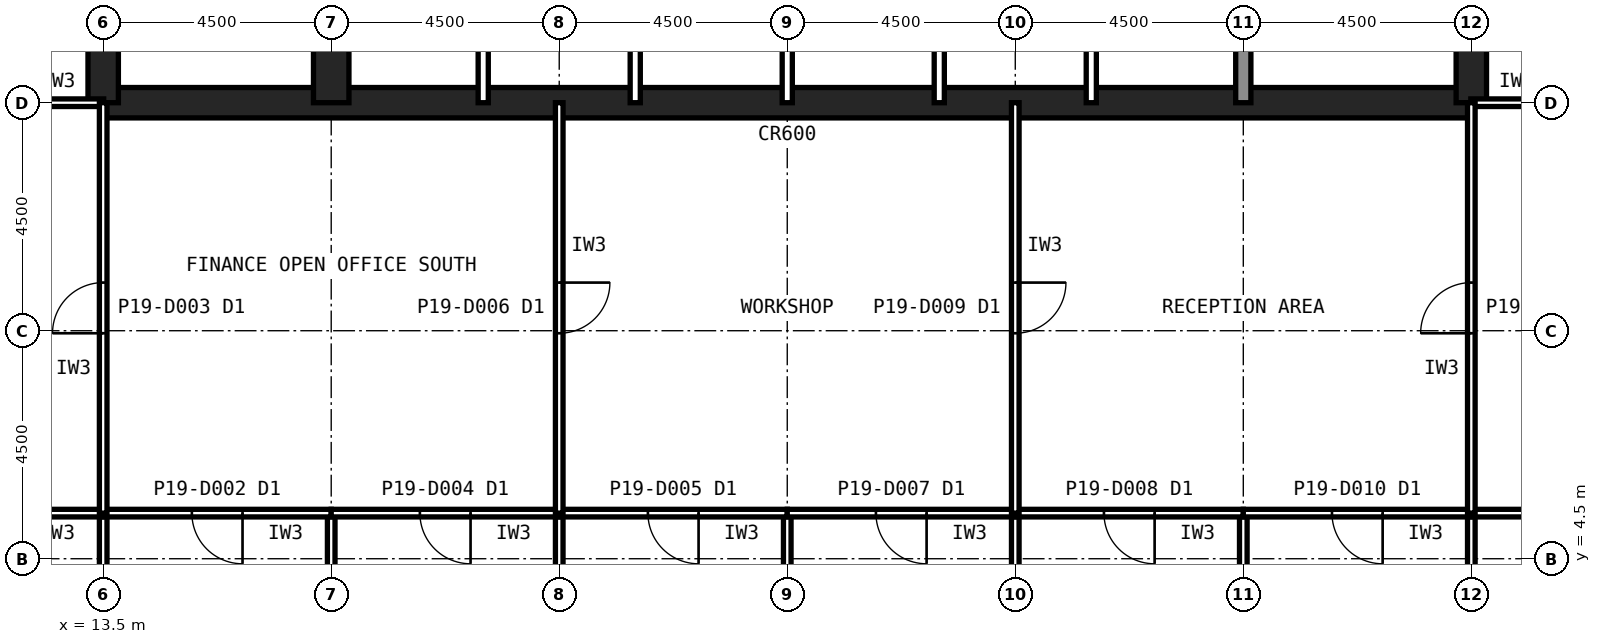
"""IFC4 building model, lengths in metres.
Left out: names, types, materials, properties, quantities, classifications, styles, units other than length and angle.
Written with IfcOpenShell. Run it as: python <this file> out.ifc"""

import sys

from ifc_helpers import new_model, si_unit, direction, frame, frame_2d, origin, place, context, subcontext, project, spatial, rectangle, extrude, element, fill, save


model = new_model("IFC4")
c1 = context("Model", 3, precision=1e-05, world=origin(), true_north=direction((0.0, 1.0)))
c2 = subcontext(c1, "Body", "Model", "MODEL_VIEW")
j1 = project(units=[si_unit("LENGTHUNIT", "METRE"), si_unit("PLANEANGLEUNIT", "RADIAN")], contexts=[c1])
p1 = place(None, origin())
s1 = spatial("IfcSite", under=j1, at=p1, CompositionType="ELEMENT")
p2 = place(p1, origin())
s2 = spatial("IfcBuilding", under=s1, at=p2, CompositionType="ELEMENT")
p3 = place(p2, frame((0.0, 0.0, 79.4)))
s3 = spatial("IfcBuildingStorey", under=s2, at=p3, CompositionType="ELEMENT", Elevation=79.4)
p4 = place(p3, frame((13.5, 13.5, 0.0), z_axis=(0.0, 0.0, 1.0), x_axis=(1.0, 0.0, 0.0)))
e1 = element("IfcWall", 1, at=p4, inside=s3, PredefinedType="SHEAR", context=c2, shape_type="SweptSolid", body=[
    extrude(rectangle(XDim=27.0, YDim=0.6, at=frame_2d((13.5, 0.0))), origin(), (0.0, 0.0, 1.0), 4.2),
])
p5 = place(p3, frame((40.5, 13.5, 0.0), z_axis=(0.0, 0.0, 1.0), x_axis=(0.0, 1.0, 0.0)))
e2 = element("IfcWall", 2, at=p5, inside=s3, PredefinedType="SHEAR", context=c2, shape_type="SweptSolid", body=[
    extrude(rectangle(XDim=27.0, YDim=0.6, at=frame_2d((13.5, 0.0))), origin(), (0.0, 0.0, 1.0), 4.2),
])
p6 = place(p5, frame((5.85, 0.0, 0.0)))
e3 = element("IfcOpeningElement", 3, at=p6, cuts=e2, PredefinedType="OPENING", context=c2, shape_type="SweptSolid", body=[
    extrude(rectangle(XDim=1.8, YDim=2.1, at=frame_2d((0.9, 1.05))), frame((0.0, 0.31, 0.0), z_axis=(0.0, -1.0, 0.0), x_axis=(1.0, 0.0, 0.0)), (0.0, 0.0, 1.0), 0.62),
])
p7 = place(p5, frame((19.65, 0.0, 0.0)))
e4 = element("IfcOpeningElement", 4, at=p7, cuts=e2, PredefinedType="OPENING", context=c2, shape_type="SweptSolid", body=[
    extrude(rectangle(XDim=1.2, YDim=2.1, at=frame_2d((0.6, 1.05))), frame((0.0, 0.31, 0.0), z_axis=(0.0, -1.0, 0.0), x_axis=(1.0, 0.0, 0.0)), (0.0, 0.0, 1.0), 0.62),
])
p8 = place(p3, frame((13.5, 40.5, 0.0), z_axis=(0.0, 0.0, 1.0), x_axis=(0.0, -1.0, 0.0)))
e5 = element("IfcWall", 5, at=p8, inside=s3, PredefinedType="SHEAR", context=c2, shape_type="SweptSolid", body=[
    extrude(rectangle(XDim=27.0, YDim=0.6, at=frame_2d((13.5, 0.0))), origin(), (0.0, 0.0, 1.0), 4.2),
])
p9 = place(p8, frame((19.65, 0.0, 0.0)))
e6 = element("IfcOpeningElement", 6, at=p9, cuts=e5, PredefinedType="OPENING", context=c2, shape_type="SweptSolid", body=[
    extrude(rectangle(XDim=1.2, YDim=2.1, at=frame_2d((0.6, 1.05))), frame((0.0, 0.31, 0.0), z_axis=(0.0, -1.0, 0.0), x_axis=(1.0, 0.0, 0.0)), (0.0, 0.0, 1.0), 0.62),
])
p10 = place(p8, frame((5.85, 0.0, 0.0)))
e7 = element("IfcOpeningElement", 7, at=p10, cuts=e5, PredefinedType="OPENING", context=c2, shape_type="SweptSolid", body=[
    extrude(rectangle(XDim=1.8, YDim=2.1, at=frame_2d((0.9, 1.05))), frame((0.0, 0.31, 0.0), z_axis=(0.0, -1.0, 0.0), x_axis=(1.0, 0.0, 0.0)), (0.0, 0.0, 1.0), 0.62),
])
p11 = place(p3, frame((18.0, 13.5, 0.0), z_axis=(0.0, 0.0, 1.0), x_axis=(0.0, 1.0, 0.0)))
e8 = element("IfcWall", 8, at=p11, inside=s3, PredefinedType="SHEAR", context=c2, shape_type="SweptSolid", body=[
    extrude(rectangle(XDim=18.0, YDim=0.7, at=frame_2d((9.0, 0.0))), origin(), (0.0, 0.0, 1.0), 4.2),
])
p12 = place(p3, frame((36.0, 13.5, 0.0), z_axis=(0.0, 0.0, 1.0), x_axis=(0.0, 1.0, 0.0)))
e9 = element("IfcWall", 9, at=p12, inside=s3, PredefinedType="SOLIDWALL", context=c2, shape_type="SweptSolid", body=[
    extrude(rectangle(XDim=4.5, YDim=0.3, at=frame_2d((2.25, 0.0))), origin(), (0.0, 0.0, 1.0), 4.04),
])
for number, where, z_axis, x_axis in (
    (10, (21.0, 13.5, 0.0), (0.0, 0.0, 1.0), (0.0, 1.0, 0.0)),
    (11, (24.0, 13.5, 0.0), (0.0, 0.0, 1.0), (0.0, 1.0, 0.0)),
    (12, (27.0, 13.5, 0.0), (0.0, 0.0, 1.0), (0.0, 1.0, 0.0)),
    (13, (30.0, 13.5, 0.0), (0.0, 0.0, 1.0), (0.0, 1.0, 0.0)),
    (14, (33.0, 13.5, 0.0), (0.0, 0.0, 1.0), (0.0, 1.0, 0.0)),
):
    element("IfcWall", number, at=place(p3, frame(where, z_axis=z_axis, x_axis=x_axis)), inside=s3, PredefinedType="PARTITIONING", context=c2, shape_type="SweptSolid", body=[
        extrude(rectangle(XDim=4.5, YDim=0.2, at=frame_2d((2.25, 0.0))), origin(), (0.0, 0.0, 1.0), 4.04),
    ])
for number, where, z_axis, x_axis in (
    (15, (11.7, 13.5, 0.0), (0.0, 0.0, 1.0), (1.0, 0.0, 0.0)),
    (16, (40.49, 13.5, 0.0), (0.0, 0.0, 1.0), (1.0, 0.0, 0.0)),
):
    element("IfcWall", number, at=place(p3, frame(where, z_axis=z_axis, x_axis=x_axis)), inside=s3, PredefinedType="PARTITIONING", context=c2, shape_type="SweptSolid", body=[
        extrude(rectangle(XDim=1.81, YDim=0.15, at=frame_2d((0.905, 0.0))), origin(), (0.0, 0.0, 1.0), 3.189),
    ])
p13 = place(p3, frame((13.5, 0.435, 0.0), z_axis=(0.0, 0.0, 1.0), x_axis=(0.0, 1.0, 0.0)))
e17 = element("IfcWall", 17, at=p13, inside=s3, PredefinedType="PARTITIONING", context=c2, shape_type="SweptSolid", body=[
    extrude(rectangle(XDim=4.965, YDim=0.15, at=frame_2d((2.482, 0.0))), origin(), (0.0, 0.0, 1.0), 3.189),
])
p14 = place(p3, frame((13.5, 5.4, 0.0), z_axis=(0.0, 0.0, 1.0), x_axis=(-1.0, 0.0, 0.0)))
e18 = element("IfcWall", 18, at=p14, inside=s3, PredefinedType="PARTITIONING", context=c2, shape_type="SweptSolid", body=[
    extrude(rectangle(XDim=4.5, YDim=0.15, at=frame_2d((2.25, 0.0))), origin(), (0.0, 0.0, 1.0), 4.04),
])
p15 = place(p14, frame((1.75, 0.0, 0.0)))
e19 = element("IfcOpeningElement", 19, at=p15, cuts=e18, PredefinedType="OPENING", context=c2, shape_type="SweptSolid", body=[
    extrude(rectangle(XDim=1.0, YDim=2.1, at=frame_2d((0.5, 1.05))), frame((0.0, 0.085, 0.0), z_axis=(0.0, -1.0, 0.0), x_axis=(1.0, 0.0, 0.0)), (0.0, 0.0, 1.0), 0.17),
])
p16 = place(p3, frame((18.0, 0.46, 0.0), z_axis=(0.0, 0.0, 1.0), x_axis=(0.0, 1.0, 0.0)))
e20 = element("IfcWall", 20, at=p16, inside=s3, PredefinedType="PARTITIONING", context=c2, shape_type="SweptSolid", body=[
    extrude(rectangle(XDim=4.94, YDim=0.15, at=frame_2d((2.47, 0.0))), origin(), (0.0, 0.0, 1.0), 3.189),
])
p17 = place(p3, frame((18.0, 5.4, 0.0), z_axis=(0.0, 0.0, 1.0), x_axis=(-1.0, 0.0, 0.0)))
e21 = element("IfcWall", 21, at=p17, inside=s3, PredefinedType="PARTITIONING", context=c2, shape_type="SweptSolid", body=[
    extrude(rectangle(XDim=4.5, YDim=0.15, at=frame_2d((2.25, 0.0))), origin(), (0.0, 0.0, 1.0), 4.04),
])
p18 = place(p17, frame((1.75, 0.0, 0.0)))
e22 = element("IfcOpeningElement", 22, at=p18, cuts=e21, PredefinedType="OPENING", context=c2, shape_type="SweptSolid", body=[
    extrude(rectangle(XDim=1.0, YDim=2.1, at=frame_2d((0.5, 1.05))), frame((0.0, 0.085, 0.0), z_axis=(0.0, -1.0, 0.0), x_axis=(1.0, 0.0, 0.0)), (0.0, 0.0, 1.0), 0.17),
])
p19 = place(p3, frame((22.5, 0.41, 0.0), z_axis=(0.0, 0.0, 1.0), x_axis=(0.0, 1.0, 0.0)))
e23 = element("IfcWall", 23, at=p19, inside=s3, PredefinedType="PARTITIONING", context=c2, shape_type="SweptSolid", body=[
    extrude(rectangle(XDim=4.99, YDim=0.15, at=frame_2d((2.495, 0.0))), origin(), (0.0, 0.0, 1.0), 3.189),
])
p20 = place(p3, frame((22.5, 5.4, 0.0), z_axis=(0.0, 0.0, 1.0), x_axis=(-1.0, 0.0, 0.0)))
e24 = element("IfcWall", 24, at=p20, inside=s3, PredefinedType="PARTITIONING", context=c2, shape_type="SweptSolid", body=[
    extrude(rectangle(XDim=4.5, YDim=0.15, at=frame_2d((2.25, 0.0))), origin(), (0.0, 0.0, 1.0), 4.04),
])
p21 = place(p20, frame((1.75, 0.0, 0.0)))
e25 = element("IfcOpeningElement", 25, at=p21, cuts=e24, PredefinedType="OPENING", context=c2, shape_type="SweptSolid", body=[
    extrude(rectangle(XDim=1.0, YDim=2.1, at=frame_2d((0.5, 1.05))), frame((0.0, 0.085, 0.0), z_axis=(0.0, -1.0, 0.0), x_axis=(1.0, 0.0, 0.0)), (0.0, 0.0, 1.0), 0.17),
])
p22 = place(p3, frame((27.0, 0.41, 0.0), z_axis=(0.0, 0.0, 1.0), x_axis=(0.0, 1.0, 0.0)))
e26 = element("IfcWall", 26, at=p22, inside=s3, PredefinedType="PARTITIONING", context=c2, shape_type="SweptSolid", body=[
    extrude(rectangle(XDim=4.99, YDim=0.15, at=frame_2d((2.495, 0.0))), origin(), (0.0, 0.0, 1.0), 3.189),
])
p23 = place(p3, frame((27.0, 5.4, 0.0), z_axis=(0.0, 0.0, 1.0), x_axis=(-1.0, 0.0, 0.0)))
e27 = element("IfcWall", 27, at=p23, inside=s3, PredefinedType="PARTITIONING", context=c2, shape_type="SweptSolid", body=[
    extrude(rectangle(XDim=4.5, YDim=0.15, at=frame_2d((2.25, 0.0))), origin(), (0.0, 0.0, 1.0), 4.04),
])
p24 = place(p23, frame((1.75, 0.0, 0.0)))
e28 = element("IfcOpeningElement", 28, at=p24, cuts=e27, PredefinedType="OPENING", context=c2, shape_type="SweptSolid", body=[
    extrude(rectangle(XDim=1.0, YDim=2.1, at=frame_2d((0.5, 1.05))), frame((0.0, 0.085, 0.0), z_axis=(0.0, -1.0, 0.0), x_axis=(1.0, 0.0, 0.0)), (0.0, 0.0, 1.0), 0.17),
])
p25 = place(p3, frame((31.5, 0.41, 0.0), z_axis=(0.0, 0.0, 1.0), x_axis=(0.0, 1.0, 0.0)))
e29 = element("IfcWall", 29, at=p25, inside=s3, PredefinedType="PARTITIONING", context=c2, shape_type="SweptSolid", body=[
    extrude(rectangle(XDim=4.99, YDim=0.15, at=frame_2d((2.495, 0.0))), origin(), (0.0, 0.0, 1.0), 3.189),
])
p26 = place(p3, frame((31.5, 5.4, 0.0), z_axis=(0.0, 0.0, 1.0), x_axis=(-1.0, 0.0, 0.0)))
e30 = element("IfcWall", 30, at=p26, inside=s3, PredefinedType="PARTITIONING", context=c2, shape_type="SweptSolid", body=[
    extrude(rectangle(XDim=4.5, YDim=0.15, at=frame_2d((2.25, 0.0))), origin(), (0.0, 0.0, 1.0), 4.04),
])
p27 = place(p26, frame((1.75, 0.0, 0.0)))
e31 = element("IfcOpeningElement", 31, at=p27, cuts=e30, PredefinedType="OPENING", context=c2, shape_type="SweptSolid", body=[
    extrude(rectangle(XDim=1.0, YDim=2.1, at=frame_2d((0.5, 1.05))), frame((0.0, 0.085, 0.0), z_axis=(0.0, -1.0, 0.0), x_axis=(1.0, 0.0, 0.0)), (0.0, 0.0, 1.0), 0.17),
])
p28 = place(p3, frame((36.0, 0.46, 0.0), z_axis=(0.0, 0.0, 1.0), x_axis=(0.0, 1.0, 0.0)))
e32 = element("IfcWall", 32, at=p28, inside=s3, PredefinedType="PARTITIONING", context=c2, shape_type="SweptSolid", body=[
    extrude(rectangle(XDim=4.94, YDim=0.15, at=frame_2d((2.47, 0.0))), origin(), (0.0, 0.0, 1.0), 3.189),
])
p29 = place(p3, frame((36.0, 5.4, 0.0), z_axis=(0.0, 0.0, 1.0), x_axis=(-1.0, 0.0, 0.0)))
e33 = element("IfcWall", 33, at=p29, inside=s3, PredefinedType="PARTITIONING", context=c2, shape_type="SweptSolid", body=[
    extrude(rectangle(XDim=4.5, YDim=0.15, at=frame_2d((2.25, 0.0))), origin(), (0.0, 0.0, 1.0), 4.04),
])
p30 = place(p29, frame((1.75, 0.0, 0.0)))
e34 = element("IfcOpeningElement", 34, at=p30, cuts=e33, PredefinedType="OPENING", context=c2, shape_type="SweptSolid", body=[
    extrude(rectangle(XDim=1.0, YDim=2.1, at=frame_2d((0.5, 1.05))), frame((0.0, 0.085, 0.0), z_axis=(0.0, -1.0, 0.0), x_axis=(1.0, 0.0, 0.0)), (0.0, 0.0, 1.0), 0.17),
])
p31 = place(p3, frame((40.5, 0.435, 0.0), z_axis=(0.0, 0.0, 1.0), x_axis=(0.0, 1.0, 0.0)))
e35 = element("IfcWall", 35, at=p31, inside=s3, PredefinedType="PARTITIONING", context=c2, shape_type="SweptSolid", body=[
    extrude(rectangle(XDim=4.965, YDim=0.15, at=frame_2d((2.482, 0.0))), origin(), (0.0, 0.0, 1.0), 3.189),
])
p32 = place(p3, frame((40.5, 5.4, 0.0), z_axis=(0.0, 0.0, 1.0), x_axis=(-1.0, 0.0, 0.0)))
e36 = element("IfcWall", 36, at=p32, inside=s3, PredefinedType="PARTITIONING", context=c2, shape_type="SweptSolid", body=[
    extrude(rectangle(XDim=4.5, YDim=0.15, at=frame_2d((2.25, 0.0))), origin(), (0.0, 0.0, 1.0), 4.04),
])
p33 = place(p32, frame((1.75, 0.0, 0.0)))
e37 = element("IfcOpeningElement", 37, at=p33, cuts=e36, PredefinedType="OPENING", context=c2, shape_type="SweptSolid", body=[
    extrude(rectangle(XDim=1.0, YDim=2.1, at=frame_2d((0.5, 1.05))), frame((0.0, 0.085, 0.0), z_axis=(0.0, -1.0, 0.0), x_axis=(1.0, 0.0, 0.0)), (0.0, 0.0, 1.0), 0.17),
])
p34 = place(p3, frame((45.0, 5.4, 0.0), z_axis=(0.0, 0.0, 1.0), x_axis=(-1.0, 0.0, 0.0)))
e38 = element("IfcWall", 38, at=p34, inside=s3, PredefinedType="PARTITIONING", context=c2, shape_type="SweptSolid", body=[
    extrude(rectangle(XDim=4.5, YDim=0.15, at=frame_2d((2.25, 0.0))), origin(), (0.0, 0.0, 1.0), 4.04),
])
p35 = place(p34, frame((1.75, 0.0, 0.0)))
e39 = element("IfcOpeningElement", 39, at=p35, cuts=e38, PredefinedType="OPENING", context=c2, shape_type="SweptSolid", body=[
    extrude(rectangle(XDim=1.0, YDim=2.1, at=frame_2d((0.5, 1.05))), frame((0.0, 0.085, 0.0), z_axis=(0.0, -1.0, 0.0), x_axis=(1.0, 0.0, 0.0)), (0.0, 0.0, 1.0), 0.17),
])
p36 = place(p3, frame((40.5, 5.4, 0.0), z_axis=(0.0, 0.0, 1.0), x_axis=(0.0, 1.0, 0.0)))
e40 = element("IfcWall", 40, at=p36, inside=s3, PredefinedType="PARTITIONING", context=c2, shape_type="SweptSolid", body=[
    extrude(rectangle(XDim=8.1, YDim=0.15, at=frame_2d((4.05, 0.0))), origin(), (0.0, 0.0, 1.0), 3.189),
])
p37 = place(p36, frame((3.55, 0.0, 0.0)))
e41 = element("IfcOpeningElement", 41, at=p37, cuts=e40, PredefinedType="OPENING", context=c2, shape_type="SweptSolid", body=[
    extrude(rectangle(XDim=1.0, YDim=2.1, at=frame_2d((0.5, 1.05))), frame((0.0, 0.085, 0.0), z_axis=(0.0, -1.0, 0.0), x_axis=(1.0, 0.0, 0.0)), (0.0, 0.0, 1.0), 0.17),
])
p38 = place(p3, frame((13.5, 5.4, 0.0), z_axis=(0.0, 0.0, 1.0), x_axis=(0.0, 1.0, 0.0)))
e42 = element("IfcWall", 42, at=p38, inside=s3, PredefinedType="PARTITIONING", context=c2, shape_type="SweptSolid", body=[
    extrude(rectangle(XDim=8.1, YDim=0.15, at=frame_2d((4.05, 0.0))), origin(), (0.0, 0.0, 1.0), 3.189),
])
p39 = place(p38, frame((3.55, 0.0, 0.0)))
e43 = element("IfcOpeningElement", 43, at=p39, cuts=e42, PredefinedType="OPENING", context=c2, shape_type="SweptSolid", body=[
    extrude(rectangle(XDim=1.0, YDim=2.1, at=frame_2d((0.5, 1.05))), frame((0.0, 0.085, 0.0), z_axis=(0.0, -1.0, 0.0), x_axis=(1.0, 0.0, 0.0)), (0.0, 0.0, 1.0), 0.17),
])
p40 = place(p3, frame((22.5, 13.5, 0.0), z_axis=(0.0, 0.0, 1.0), x_axis=(0.0, -1.0, 0.0)))
e44 = element("IfcWall", 44, at=p40, inside=s3, PredefinedType="PARTITIONING", context=c2, shape_type="SweptSolid", body=[
    extrude(rectangle(XDim=8.1, YDim=0.15, at=frame_2d((4.05, 0.0))), origin(), (0.0, 0.0, 1.0), 3.189),
])
p41 = place(p40, frame((3.55, 0.0, 0.0)))
e45 = element("IfcOpeningElement", 45, at=p41, cuts=e44, PredefinedType="OPENING", context=c2, shape_type="SweptSolid", body=[
    extrude(rectangle(XDim=1.0, YDim=2.1, at=frame_2d((0.5, 1.05))), frame((0.0, 0.085, 0.0), z_axis=(0.0, -1.0, 0.0), x_axis=(1.0, 0.0, 0.0)), (0.0, 0.0, 1.0), 0.17),
])
p42 = place(p3, frame((31.5, 13.5, 0.0), z_axis=(0.0, 0.0, 1.0), x_axis=(0.0, -1.0, 0.0)))
e46 = element("IfcWall", 46, at=p42, inside=s3, PredefinedType="PARTITIONING", context=c2, shape_type="SweptSolid", body=[
    extrude(rectangle(XDim=8.1, YDim=0.15, at=frame_2d((4.05, 0.0))), origin(), (0.0, 0.0, 1.0), 3.189),
])
p43 = place(p42, frame((3.55, 0.0, 0.0)))
e47 = element("IfcOpeningElement", 47, at=p43, cuts=e46, PredefinedType="OPENING", context=c2, shape_type="SweptSolid", body=[
    extrude(rectangle(XDim=1.0, YDim=2.1, at=frame_2d((0.5, 1.05))), frame((0.0, 0.085, 0.0), z_axis=(0.0, -1.0, 0.0), x_axis=(1.0, 0.0, 0.0)), (0.0, 0.0, 1.0), 0.17),
])
p44 = place(p18, origin())
e48 = element("IfcDoor", 48, at=p44, inside=s3, OperationType="SINGLE_SWING_LEFT", PredefinedType="DOOR", context=c2, shape_type="SweptSolid", body=[
    extrude(rectangle(XDim=1.0, YDim=2.1, at=frame_2d((0.5, 1.05))), frame((0.0, 0.025, 0.0), z_axis=(0.0, -1.0, 0.0), x_axis=(1.0, 0.0, 0.0)), (0.0, 0.0, 1.0), 0.05),
])
fill(e22, e48)
p45 = place(p21, origin())
e49 = element("IfcDoor", 49, at=p45, inside=s3, OperationType="SINGLE_SWING_LEFT", PredefinedType="DOOR", context=c2, shape_type="SweptSolid", body=[
    extrude(rectangle(XDim=1.0, YDim=2.1, at=frame_2d((0.5, 1.05))), frame((0.0, 0.025, 0.0), z_axis=(0.0, -1.0, 0.0), x_axis=(1.0, 0.0, 0.0)), (0.0, 0.0, 1.0), 0.05),
])
fill(e25, e49)
p46 = place(p24, origin())
e50 = element("IfcDoor", 50, at=p46, inside=s3, OperationType="SINGLE_SWING_LEFT", PredefinedType="DOOR", context=c2, shape_type="SweptSolid", body=[
    extrude(rectangle(XDim=1.0, YDim=2.1, at=frame_2d((0.5, 1.05))), frame((0.0, 0.025, 0.0), z_axis=(0.0, -1.0, 0.0), x_axis=(1.0, 0.0, 0.0)), (0.0, 0.0, 1.0), 0.05),
])
fill(e28, e50)
p47 = place(p27, origin())
e51 = element("IfcDoor", 51, at=p47, inside=s3, OperationType="SINGLE_SWING_LEFT", PredefinedType="DOOR", context=c2, shape_type="SweptSolid", body=[
    extrude(rectangle(XDim=1.0, YDim=2.1, at=frame_2d((0.5, 1.05))), frame((0.0, 0.025, 0.0), z_axis=(0.0, -1.0, 0.0), x_axis=(1.0, 0.0, 0.0)), (0.0, 0.0, 1.0), 0.05),
])
fill(e31, e51)
p48 = place(p30, origin())
e52 = element("IfcDoor", 52, at=p48, inside=s3, OperationType="SINGLE_SWING_LEFT", PredefinedType="DOOR", context=c2, shape_type="SweptSolid", body=[
    extrude(rectangle(XDim=1.0, YDim=2.1, at=frame_2d((0.5, 1.05))), frame((0.0, 0.025, 0.0), z_axis=(0.0, -1.0, 0.0), x_axis=(1.0, 0.0, 0.0)), (0.0, 0.0, 1.0), 0.05),
])
fill(e34, e52)
p49 = place(p33, origin())
e53 = element("IfcDoor", 53, at=p49, inside=s3, OperationType="SINGLE_SWING_LEFT", PredefinedType="DOOR", context=c2, shape_type="SweptSolid", body=[
    extrude(rectangle(XDim=1.0, YDim=2.1, at=frame_2d((0.5, 1.05))), frame((0.0, 0.025, 0.0), z_axis=(0.0, -1.0, 0.0), x_axis=(1.0, 0.0, 0.0)), (0.0, 0.0, 1.0), 0.05),
])
fill(e37, e53)
p50 = place(p37, origin())
e54 = element("IfcDoor", 54, at=p50, inside=s3, OperationType="SINGLE_SWING_LEFT", PredefinedType="DOOR", context=c2, shape_type="SweptSolid", body=[
    extrude(rectangle(XDim=1.0, YDim=2.1, at=frame_2d((0.5, 1.05))), frame((0.0, 0.025, 0.0), z_axis=(0.0, -1.0, 0.0), x_axis=(1.0, 0.0, 0.0)), (0.0, 0.0, 1.0), 0.05),
])
fill(e41, e54)
p51 = place(p39, origin())
e55 = element("IfcDoor", 55, at=p51, inside=s3, OperationType="SINGLE_SWING_LEFT", PredefinedType="DOOR", context=c2, shape_type="SweptSolid", body=[
    extrude(rectangle(XDim=1.0, YDim=2.1, at=frame_2d((0.5, 1.05))), frame((0.0, 0.025, 0.0), z_axis=(0.0, -1.0, 0.0), x_axis=(1.0, 0.0, 0.0)), (0.0, 0.0, 1.0), 0.05),
])
fill(e43, e55)
p52 = place(p41, origin())
e56 = element("IfcDoor", 56, at=p52, inside=s3, OperationType="SINGLE_SWING_LEFT", PredefinedType="DOOR", context=c2, shape_type="SweptSolid", body=[
    extrude(rectangle(XDim=1.0, YDim=2.1, at=frame_2d((0.5, 1.05))), frame((0.0, 0.025, 0.0), z_axis=(0.0, -1.0, 0.0), x_axis=(1.0, 0.0, 0.0)), (0.0, 0.0, 1.0), 0.05),
])
fill(e45, e56)
p53 = place(p43, origin())
e57 = element("IfcDoor", 57, at=p53, inside=s3, OperationType="SINGLE_SWING_LEFT", PredefinedType="DOOR", context=c2, shape_type="SweptSolid", body=[
    extrude(rectangle(XDim=1.0, YDim=2.1, at=frame_2d((0.5, 1.05))), frame((0.0, 0.025, 0.0), z_axis=(0.0, -1.0, 0.0), x_axis=(1.0, 0.0, 0.0)), (0.0, 0.0, 1.0), 0.05),
])
fill(e47, e57)
save(model, sys.argv[1])
